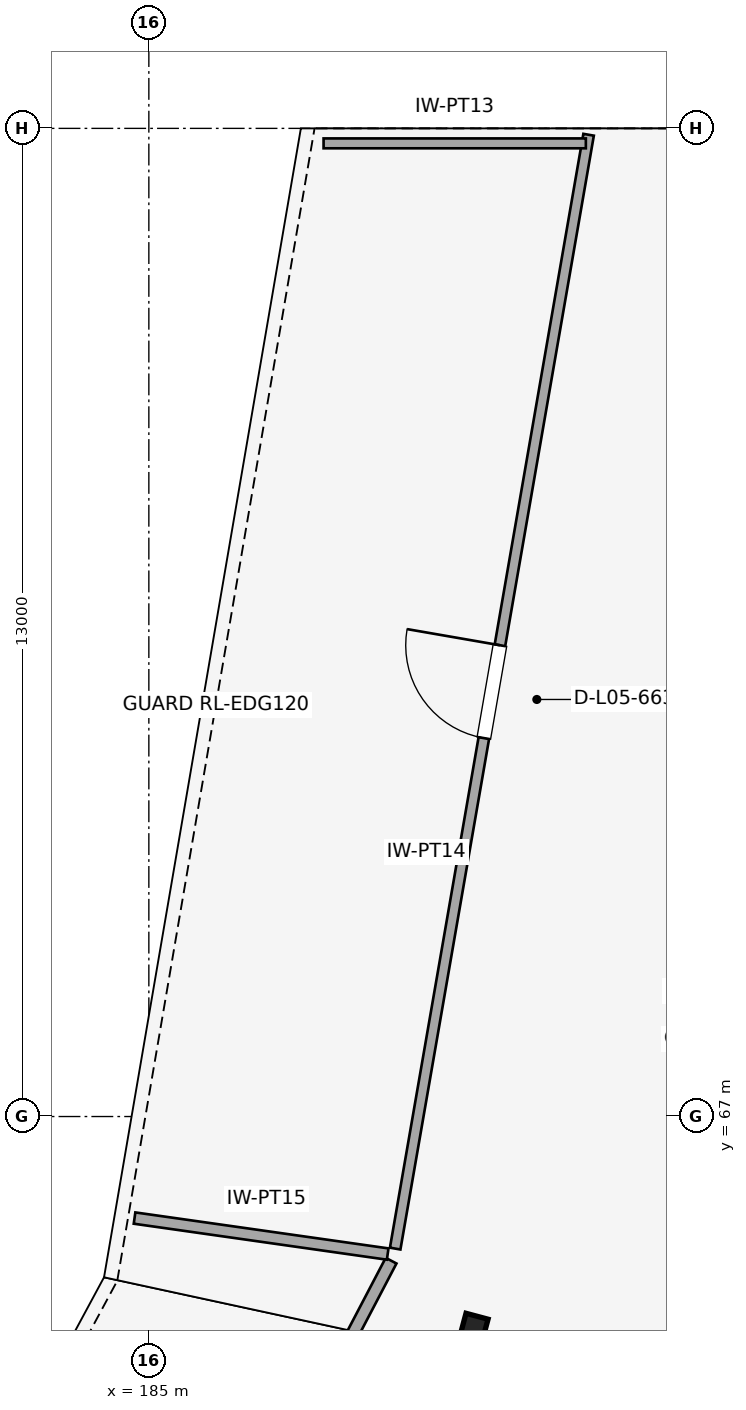
"""IFC4 building model, lengths in metres.
Left out: names, types, materials, properties, quantities, classifications, styles, units other than length and angle.
Written with IfcOpenShell. Run it as: python <this file> out.ifc"""

import sys

from ifc_helpers import new_model, si_unit, direction, frame, frame_2d, origin, origin_2d, place, context, subcontext, project, spatial, rectangle, i_section, extrude, element, fill, save


model = new_model("IFC4")
c1 = context("Model", 3, precision=1e-05, world=origin(), true_north=direction((0.0, 1.0)))
c2 = subcontext(c1, "Body", "Model", "MODEL_VIEW")
j1 = project(units=[si_unit("LENGTHUNIT", "METRE"), si_unit("PLANEANGLEUNIT", "RADIAN")], contexts=[c1])
p1 = place(None, origin())
s1 = spatial("IfcSite", under=j1, at=p1, CompositionType="ELEMENT")
p2 = place(p1, origin())
s2 = spatial("IfcBuilding", under=s1, at=p2, CompositionType="ELEMENT")
p3 = place(p2, frame((0.0, 0.0, 26.2)))
s3 = spatial("IfcBuildingStorey", under=s2, at=p3, CompositionType="ELEMENT", Elevation=26.2)
p4 = place(p3, frame((189.24, 64.083, 0.0), z_axis=(0.0, 0.0, 1.0), x_axis=(0.965925826289, -0.258819045103, 0.0)))
e1 = element("IfcColumn", 1, at=p4, inside=s3, PredefinedType="COLUMN", context=c2, shape_type="SweptSolid", body=[
    extrude(i_section(OverallWidth=0.3, OverallDepth=0.6, WebThickness=0.015, FlangeThickness=0.03, FilletRadius=0.027, at=origin_2d()), origin(), (0.0, 0.0, 1.0), 5.6),
])
p5 = place(p3, frame((181.035, 51.449, 0.0), z_axis=(0.0, 0.0, 1.0), x_axis=(0.463973851802, 0.88584889504, 0.0)))
e2 = element("IfcWall", 2, at=p5, inside=s3, PredefinedType="PARTITIONING", context=c2, shape_type="SweptSolid", body=[
    extrude(rectangle(XDim=15.414, YDim=0.16, at=frame_2d((7.707, 0.0))), origin(), (0.0, 0.0, 1.0), 4.1),
])
p6 = place(p5, frame((7.127, 0.0, 0.0)))
e3 = element("IfcOpeningElement", 3, at=p6, cuts=e2, PredefinedType="OPENING", context=c2, shape_type="SweptSolid", body=[
    extrude(rectangle(XDim=1.16, YDim=2.38, at=frame_2d((0.58, 1.19))), frame((0.0, 0.09, 0.0), z_axis=(0.0, -1.0, 0.0), x_axis=(1.0, 0.0, 0.0)), (0.0, 0.0, 1.0), 0.18),
])
p7 = place(p3, frame((184.812, 65.664, 0.0), z_axis=(0.0, 0.0, 1.0), x_axis=(0.990047959754, -0.140730371231, 0.0)))
e4 = element("IfcWall", 4, at=p7, inside=s3, PredefinedType="PARTITIONING", context=c2, shape_type="SweptSolid", body=[
    extrude(rectangle(XDim=3.364, YDim=0.15, at=frame_2d((1.682, 0.0))), origin(), (0.0, 0.0, 1.0), 4.1),
])
p8 = place(p3, frame((188.241, 65.263, 0.0), z_axis=(0.0, 0.0, 1.0), x_axis=(0.171095243165, 0.985254493908, 0.0)))
e5 = element("IfcWall", 5, at=p8, inside=s3, PredefinedType="PARTITIONING", context=c2, shape_type="SweptSolid", body=[
    extrude(rectangle(XDim=14.873, YDim=0.14, at=frame_2d((7.437, 0.0))), origin(), (0.0, 0.0, 1.0), 4.1),
])
p9 = place(p8, frame((6.816, 0.0, 0.0)))
e6 = element("IfcOpeningElement", 6, at=p9, cuts=e5, PredefinedType="OPENING", context=c2, shape_type="SweptSolid", body=[
    extrude(rectangle(XDim=1.24, YDim=2.1, at=frame_2d((0.62, 1.05))), frame((0.0, 0.08, 0.0), z_axis=(0.0, -1.0, 0.0), x_axis=(1.0, 0.0, 0.0)), (0.0, 0.0, 1.0), 0.16),
])
p10 = place(p3, frame((187.299, 79.803, 0.0), z_axis=(0.0, 0.0, 1.0), x_axis=(1.0, 0.0, 0.0)))
e7 = element("IfcWall", 7, at=p10, inside=s3, PredefinedType="PARTITIONING", context=c2, shape_type="SweptSolid", body=[
    extrude(rectangle(XDim=3.45, YDim=0.13, at=frame_2d((1.725, 0.0))), origin(), (0.0, 0.0, 1.0), 4.1),
])
p11 = place(p9, origin())
e8 = element("IfcDoor", 8, at=p11, inside=s3, OperationType="SINGLE_SWING_RIGHT", PredefinedType="DOOR", context=c2, shape_type="SweptSolid", body=[
    extrude(rectangle(XDim=1.24, YDim=2.1, at=frame_2d((0.62, 1.05))), frame((0.0, 0.025, 0.0), z_axis=(0.0, -1.0, 0.0), x_axis=(1.0, 0.0, 0.0)), (0.0, 0.0, 1.0), 0.05),
])
fill(e6, e8)
save(model, sys.argv[1])
